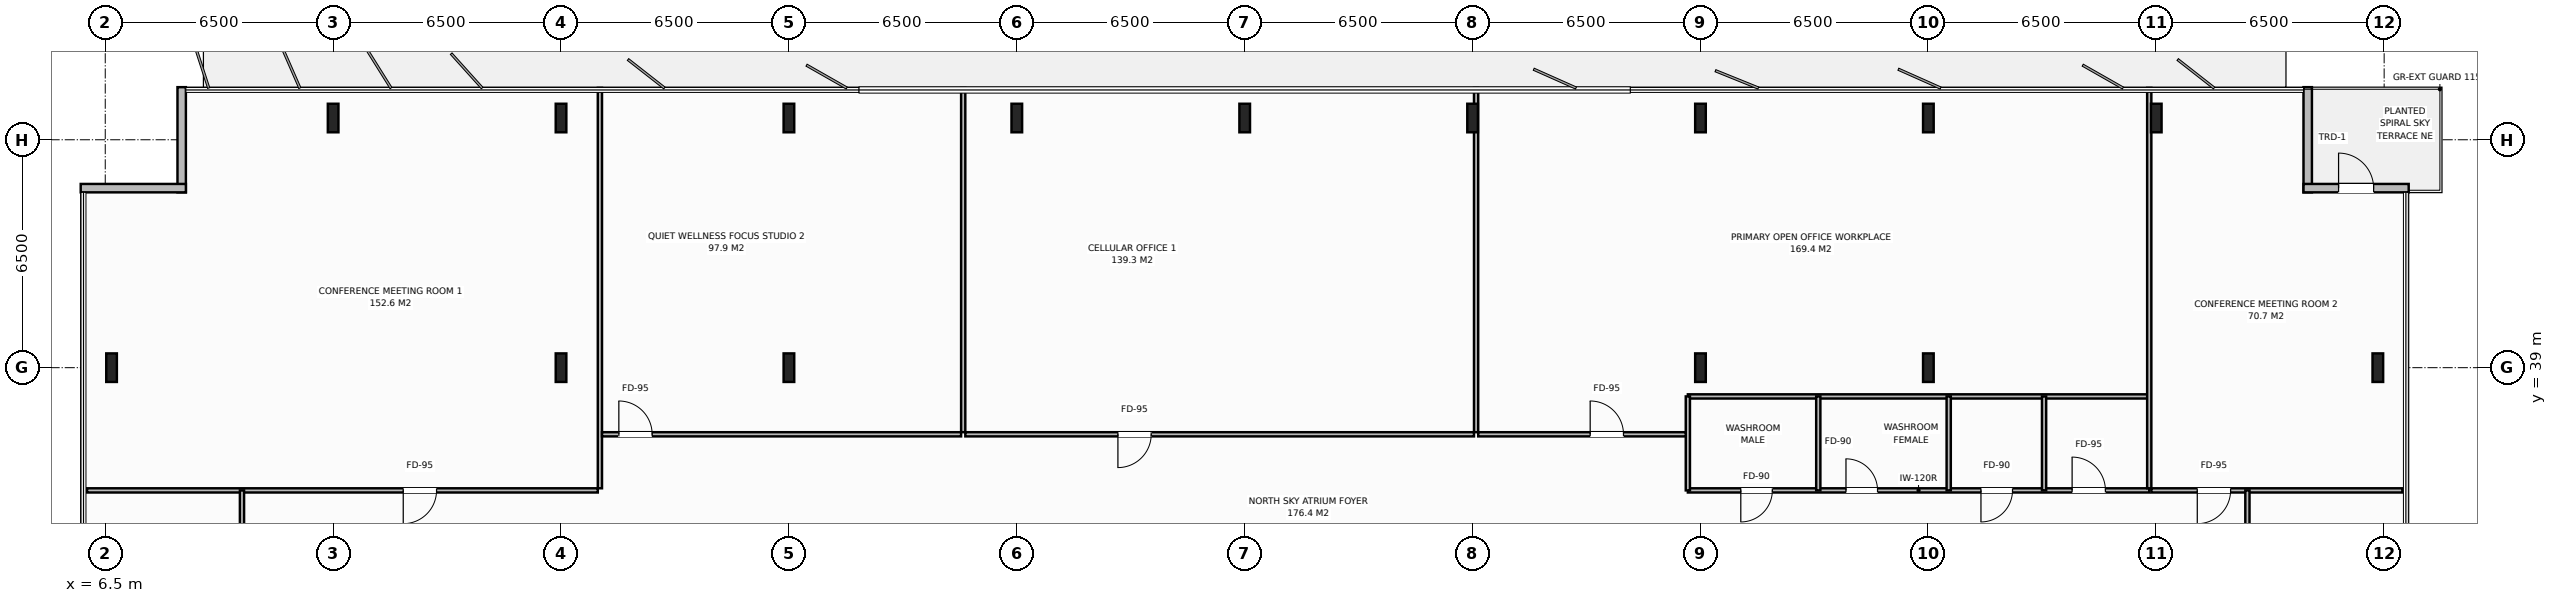
"""IFC4 building model, lengths in metres.
Left out: names, types, materials, properties, quantities, classifications, styles, units other than length and angle.
Written with IfcOpenShell. Run it as: python <this file> out.ifc"""

import sys

from ifc_helpers import new_model, si_unit, direction, frame, frame_2d, origin, origin_2d, place, context, subcontext, project, spatial, rectangle, i_section, extrude, element, fill, save


model = new_model("IFC4")
c1 = context("Model", 3, precision=1e-05, world=origin(), true_north=direction((0.0, 1.0)))
c2 = subcontext(c1, "Body", "Model", "MODEL_VIEW")
j1 = project(units=[si_unit("LENGTHUNIT", "METRE"), si_unit("PLANEANGLEUNIT", "RADIAN")], contexts=[c1])
p1 = place(None, origin())
s1 = spatial("IfcSite", under=j1, at=p1, CompositionType="ELEMENT")
p2 = place(p1, origin())
s2 = spatial("IfcBuilding", under=s1, at=p2, CompositionType="ELEMENT")
p3 = place(p2, frame((0.0, 0.0, 202.4)))
s3 = spatial("IfcBuildingStorey", under=s2, at=p3, CompositionType="ELEMENT", Elevation=202.4)
for number, where, z_axis, x_axis in (
    (1, (19.5, 39.0, 0.0), (0.0, 0.0, 1.0), (1.0, 0.0, 0.0)),
    (2, (58.5, 39.0, 0.0), (0.0, 0.0, 1.0), (1.0, 0.0, 0.0)),
    (3, (26.0, 39.0, 0.0), (0.0, 0.0, 1.0), (1.0, 0.0, 0.0)),
    (4, (52.0, 39.0, 0.0), (0.0, 0.0, 1.0), (1.0, 0.0, 0.0)),
    (5, (13.0, 46.12, 0.0), (0.0, 0.0, 1.0), (1.0, 0.0, 0.0)),
    (6, (19.5, 46.12, 0.0), (0.0, 0.0, 1.0), (1.0, 0.0, 0.0)),
    (7, (26.0, 46.12, 0.0), (0.0, 0.0, 1.0), (1.0, 0.0, 0.0)),
    (8, (32.5, 46.12, 0.0), (0.0, 0.0, 1.0), (1.0, 0.0, 0.0)),
    (9, (39.0, 46.12, 0.0), (0.0, 0.0, 1.0), (1.0, 0.0, 0.0)),
    (10, (45.5, 46.12, 0.0), (0.0, 0.0, 1.0), (1.0, 0.0, 0.0)),
    (11, (52.0, 46.12, 0.0), (0.0, 0.0, 1.0), (1.0, 0.0, 0.0)),
    (12, (58.5, 46.12, 0.0), (0.0, 0.0, 1.0), (1.0, 0.0, 0.0)),
    (13, (65.0, 46.12, 0.0), (0.0, 0.0, 1.0), (1.0, 0.0, 0.0)),
    (14, (6.68, 39.0, 0.0), (0.0, 0.0, 1.0), (1.0, 0.0, 0.0)),
    (15, (71.32, 39.0, 0.0), (0.0, 0.0, 1.0), (1.0, 0.0, 0.0)),
):
    element("IfcColumn", number, at=place(p3, frame(where, z_axis=z_axis, x_axis=x_axis)), inside=s3, PredefinedType="COLUMN", context=c2, shape_type="SweptSolid", body=[
        extrude(i_section(OverallWidth=0.303, OverallDepth=0.814, WebThickness=0.021, FlangeThickness=0.04, at=origin_2d()), origin(), (0.0, 0.0, 1.0), 3.8),
    ])
for number, where, z_axis, x_axis in (
    (16, (8.68, 44.0, 0.0), (0.0, 0.0, 1.0), (0.0, 1.0, 0.0)),
    (17, (5.8, 44.12, 0.0), (0.0, 0.0, 1.0), (1.0, 0.0, 0.0)),
    (18, (69.32, 47.0, 0.0), (0.0, 0.0, 1.0), (0.0, -1.0, 0.0)),
):
    element("IfcWall", number, at=place(p3, frame(where, z_axis=z_axis, x_axis=x_axis)), inside=s3, PredefinedType="STANDARD", context=c2, shape_type="SweptSolid", body=[
        extrude(rectangle(XDim=3.0, YDim=0.24, at=frame_2d((1.5, 0.0))), origin(), (0.0, 0.0, 1.0), 3.58),
    ])
p4 = place(p3, frame((69.2, 44.12, 0.0), z_axis=(0.0, 0.0, 1.0), x_axis=(1.0, 0.0, 0.0)))
e19 = element("IfcWall", 19, at=p4, inside=s3, PredefinedType="STANDARD", context=c2, shape_type="SweptSolid", body=[
    extrude(rectangle(XDim=3.0, YDim=0.24, at=frame_2d((1.5, 0.0))), origin(), (0.0, 0.0, 1.0), 3.58),
])
p5 = place(p4, frame((1.0, 0.0, 0.0)))
e20 = element("IfcOpeningElement", 20, at=p5, cuts=e19, PredefinedType="OPENING", context=c2, shape_type="SweptSolid", body=[
    extrude(rectangle(XDim=1.0, YDim=2.2, at=frame_2d((0.5, 1.1))), frame((0.0, 0.13, 0.0), z_axis=(0.0, -1.0, 0.0), x_axis=(1.0, 0.0, 0.0)), (0.0, 0.0, 1.0), 0.26),
])
p6 = place(p3, frame((51.64, 35.5, 0.0), z_axis=(0.0, 0.0, 1.0), x_axis=(1.0, 0.0, 0.0)))
e21 = element("IfcWall", 21, at=p6, inside=s3, PredefinedType="PARTITIONING", context=c2, shape_type="SweptSolid", body=[
    extrude(rectangle(XDim=13.16, YDim=0.12, at=frame_2d((6.58, 0.0))), origin(), (0.0, 0.0, 1.0), 3.58),
])
p7 = place(p6, frame((1.51, 0.0, 0.0)))
e22 = element("IfcOpeningElement", 22, at=p7, cuts=e21, PredefinedType="OPENING", context=c2, shape_type="SweptSolid", body=[
    extrude(rectangle(XDim=0.9, YDim=2.15, at=frame_2d((0.45, 1.075))), frame((0.0, 0.07, 0.0), z_axis=(0.0, -1.0, 0.0), x_axis=(1.0, 0.0, 0.0)), (0.0, 0.0, 1.0), 0.14),
])
p8 = place(p6, frame((4.51, 0.0, 0.0)))
e23 = element("IfcOpeningElement", 23, at=p8, cuts=e21, PredefinedType="OPENING", context=c2, shape_type="SweptSolid", body=[
    extrude(rectangle(XDim=0.9, YDim=2.15, at=frame_2d((0.45, 1.075))), frame((0.0, 0.07, 0.0), z_axis=(0.0, -1.0, 0.0), x_axis=(1.0, 0.0, 0.0)), (0.0, 0.0, 1.0), 0.14),
])
p9 = place(p6, frame((8.36, 0.0, 0.0)))
e24 = element("IfcOpeningElement", 24, at=p9, cuts=e21, PredefinedType="OPENING", context=c2, shape_type="SweptSolid", body=[
    extrude(rectangle(XDim=0.9, YDim=2.15, at=frame_2d((0.45, 1.075))), frame((0.0, 0.07, 0.0), z_axis=(0.0, -1.0, 0.0), x_axis=(1.0, 0.0, 0.0)), (0.0, 0.0, 1.0), 0.14),
])
p10 = place(p6, frame((10.96, 0.0, 0.0)))
e25 = element("IfcOpeningElement", 25, at=p10, cuts=e21, PredefinedType="OPENING", context=c2, shape_type="SweptSolid", body=[
    extrude(rectangle(XDim=0.95, YDim=2.15, at=frame_2d((0.475, 1.075))), frame((0.0, 0.07, 0.0), z_axis=(0.0, -1.0, 0.0), x_axis=(1.0, 0.0, 0.0)), (0.0, 0.0, 1.0), 0.14),
])
p11 = place(p3, frame((51.64, 38.18, 0.0), z_axis=(0.0, 0.0, 1.0), x_axis=(1.0, 0.0, 0.0)))
e26 = element("IfcWall", 26, at=p11, inside=s3, PredefinedType="PARTITIONING", context=c2, shape_type="SweptSolid", body=[
    extrude(rectangle(XDim=13.16, YDim=0.12, at=frame_2d((6.58, 0.0))), origin(), (0.0, 0.0, 1.0), 3.58),
])
for number, where, z_axis, x_axis in (
    (27, (51.64, 35.5, 0.0), (0.0, 0.0, 1.0), (0.0, 1.0, 0.0)),
    (28, (55.36, 35.5, 0.0), (0.0, 0.0, 1.0), (0.0, 1.0, 0.0)),
    (29, (59.08, 35.5, 0.0), (0.0, 0.0, 1.0), (0.0, 1.0, 0.0)),
    (30, (61.8, 35.5, 0.0), (0.0, 0.0, 1.0), (0.0, 1.0, 0.0)),
):
    element("IfcWall", number, at=place(p3, frame(where, z_axis=z_axis, x_axis=x_axis)), inside=s3, PredefinedType="PARTITIONING", context=c2, shape_type="SweptSolid", body=[
        extrude(rectangle(XDim=2.68, YDim=0.12, at=frame_2d((1.34, 0.0))), origin(), (0.0, 0.0, 1.0), 3.58),
    ])
p12 = place(p3, frame((20.609, 35.56, 0.0), z_axis=(0.0, 0.0, 1.0), x_axis=(0.0, 1.0, 0.0)))
e31 = element("IfcWall", 31, at=p12, inside=s3, PredefinedType="PARTITIONING", context=c2, shape_type="SweptSolid", body=[
    extrude(rectangle(XDim=11.42, YDim=0.12, at=frame_2d((5.71, 0.0))), origin(), (0.0, 0.0, 1.0), 3.58),
])
p13 = place(p3, frame((5.98, 35.5, 0.0), z_axis=(0.0, 0.0, 1.0), x_axis=(1.0, 0.0, 0.0)))
e32 = element("IfcWall", 32, at=p13, inside=s3, PredefinedType="PARTITIONING", context=c2, shape_type="SweptSolid", body=[
    extrude(rectangle(XDim=14.569, YDim=0.12, at=frame_2d((7.284, 0.0))), origin(), (0.0, 0.0, 1.0), 3.58),
])
p14 = place(p13, frame((9.02, 0.0, 0.0)))
e33 = element("IfcOpeningElement", 33, at=p14, cuts=e32, PredefinedType="OPENING", context=c2, shape_type="SweptSolid", body=[
    extrude(rectangle(XDim=0.95, YDim=2.15, at=frame_2d((0.475, 1.075))), frame((0.0, 0.07, 0.0), z_axis=(0.0, -1.0, 0.0), x_axis=(1.0, 0.0, 0.0)), (0.0, 0.0, 1.0), 0.14),
])
p15 = place(p3, frame((30.971, 37.16, 0.0), z_axis=(0.0, 0.0, 1.0), x_axis=(0.0, 1.0, 0.0)))
e34 = element("IfcWall", 34, at=p15, inside=s3, PredefinedType="PARTITIONING", context=c2, shape_type="SweptSolid", body=[
    extrude(rectangle(XDim=9.82, YDim=0.12, at=frame_2d((4.91, 0.0))), origin(), (0.0, 0.0, 1.0), 3.58),
])
p16 = place(p3, frame((20.669, 37.1, 0.0), z_axis=(0.0, 0.0, 1.0), x_axis=(1.0, 0.0, 0.0)))
e35 = element("IfcWall", 35, at=p16, inside=s3, PredefinedType="PARTITIONING", context=c2, shape_type="SweptSolid", body=[
    extrude(rectangle(XDim=10.242, YDim=0.12, at=frame_2d((5.121, 0.0))), origin(), (0.0, 0.0, 1.0), 3.58),
])
p17 = place(p16, frame((0.48, 0.0, 0.0)))
e36 = element("IfcOpeningElement", 36, at=p17, cuts=e35, PredefinedType="OPENING", context=c2, shape_type="SweptSolid", body=[
    extrude(rectangle(XDim=0.95, YDim=2.15, at=frame_2d((0.475, 1.075))), frame((0.0, 0.07, 0.0), z_axis=(0.0, -1.0, 0.0), x_axis=(1.0, 0.0, 0.0)), (0.0, 0.0, 1.0), 0.14),
])
p18 = place(p3, frame((45.6, 37.16, 0.0), z_axis=(0.0, 0.0, 1.0), x_axis=(0.0, 1.0, 0.0)))
e37 = element("IfcWall", 37, at=p18, inside=s3, PredefinedType="PARTITIONING", context=c2, shape_type="SweptSolid", body=[
    extrude(rectangle(XDim=9.82, YDim=0.12, at=frame_2d((4.91, 0.0))), origin(), (0.0, 0.0, 1.0), 2.88),
])
p19 = place(p3, frame((31.031, 37.1, 0.0), z_axis=(0.0, 0.0, 1.0), x_axis=(1.0, 0.0, 0.0)))
e38 = element("IfcWall", 38, at=p19, inside=s3, PredefinedType="PARTITIONING", context=c2, shape_type="SweptSolid", body=[
    extrude(rectangle(XDim=14.509, YDim=0.12, at=frame_2d((7.254, 0.0))), origin(), (0.0, 0.0, 1.0), 3.58),
])
p20 = place(p19, frame((4.353, 0.0, 0.0)))
e39 = element("IfcOpeningElement", 39, at=p20, cuts=e38, PredefinedType="OPENING", context=c2, shape_type="SweptSolid", body=[
    extrude(rectangle(XDim=0.95, YDim=2.15, at=frame_2d((0.475, 1.075))), frame((0.0, 0.07, 0.0), z_axis=(0.0, -1.0, 0.0), x_axis=(1.0, 0.0, 0.0)), (0.0, 0.0, 1.0), 0.14),
])
p21 = place(p3, frame((64.8, 35.56, 0.0), z_axis=(0.0, 0.0, 1.0), x_axis=(0.0, 1.0, 0.0)))
e40 = element("IfcWall", 40, at=p21, inside=s3, PredefinedType="PARTITIONING", context=c2, shape_type="SweptSolid", body=[
    extrude(rectangle(XDim=11.42, YDim=0.12, at=frame_2d((5.71, 0.0))), origin(), (0.0, 0.0, 1.0), 2.88),
])
p22 = place(p3, frame((45.66, 37.1, 0.0), z_axis=(0.0, 0.0, 1.0), x_axis=(1.0, 0.0, 0.0)))
e41 = element("IfcWall", 41, at=p22, inside=s3, PredefinedType="PARTITIONING", context=c2, shape_type="SweptSolid", body=[
    extrude(rectangle(XDim=5.92, YDim=0.12, at=frame_2d((2.96, 0.0))), origin(), (0.0, 0.0, 1.0), 3.58),
])
p23 = place(p22, frame((3.194, 0.0, 0.0)))
e42 = element("IfcOpeningElement", 42, at=p23, cuts=e41, PredefinedType="OPENING", context=c2, shape_type="SweptSolid", body=[
    extrude(rectangle(XDim=0.95, YDim=2.15, at=frame_2d((0.475, 1.075))), frame((0.0, 0.07, 0.0), z_axis=(0.0, -1.0, 0.0), x_axis=(1.0, 0.0, 0.0)), (0.0, 0.0, 1.0), 0.14),
])
p24 = place(p3, frame((64.86, 35.5, 0.0), z_axis=(0.0, 0.0, 1.0), x_axis=(1.0, 0.0, 0.0)))
e43 = element("IfcWall", 43, at=p24, inside=s3, PredefinedType="PARTITIONING", context=c2, shape_type="SweptSolid", body=[
    extrude(rectangle(XDim=7.16, YDim=0.12, at=frame_2d((3.58, 0.0))), origin(), (0.0, 0.0, 1.0), 3.58),
])
p25 = place(p24, frame((1.31, 0.0, 0.0)))
e44 = element("IfcOpeningElement", 44, at=p25, cuts=e43, PredefinedType="OPENING", context=c2, shape_type="SweptSolid", body=[
    extrude(rectangle(XDim=0.95, YDim=2.15, at=frame_2d((0.475, 1.075))), frame((0.0, 0.07, 0.0), z_axis=(0.0, -1.0, 0.0), x_axis=(1.0, 0.0, 0.0)), (0.0, 0.0, 1.0), 0.14),
])
p26 = place(p3, frame((10.4, 16.5, 0.0), z_axis=(0.0, 0.0, 1.0), x_axis=(0.0, 1.0, 0.0)))
e45 = element("IfcWall", 45, at=p26, inside=s3, PredefinedType="PARTITIONING", context=c2, shape_type="SweptSolid", body=[
    extrude(rectangle(XDim=19.0, YDim=0.12, at=frame_2d((9.5, 0.0))), origin(), (0.0, 0.0, 1.0), 3.58),
])
p27 = place(p26, frame((9.025, 0.0, 0.0)))
e46 = element("IfcOpeningElement", 46, at=p27, cuts=e45, PredefinedType="OPENING", context=c2, shape_type="SweptSolid", body=[
    extrude(rectangle(XDim=0.95, YDim=2.15, at=frame_2d((0.475, 1.075))), frame((0.0, 0.07, 0.0), z_axis=(0.0, -1.0, 0.0), x_axis=(1.0, 0.0, 0.0)), (0.0, 0.0, 1.0), 0.14),
])
p28 = place(p3, frame((67.6, 26.0, 0.0), z_axis=(0.0, 0.0, 1.0), x_axis=(0.0, 1.0, 0.0)))
e47 = element("IfcWall", 47, at=p28, inside=s3, PredefinedType="PARTITIONING", context=c2, shape_type="SweptSolid", body=[
    extrude(rectangle(XDim=9.5, YDim=0.12, at=frame_2d((4.75, 0.0))), origin(), (0.0, 0.0, 1.0), 3.58),
])
p29 = place(p28, frame((3.225, 0.0, 0.0)))
e48 = element("IfcOpeningElement", 48, at=p29, cuts=e47, PredefinedType="OPENING", context=c2, shape_type="SweptSolid", body=[
    extrude(rectangle(XDim=0.95, YDim=2.15, at=frame_2d((0.475, 1.075))), frame((0.0, 0.07, 0.0), z_axis=(0.0, -1.0, 0.0), x_axis=(1.0, 0.0, 0.0)), (0.0, 0.0, 1.0), 0.14),
])
p30 = place(p5, origin())
e49 = element("IfcDoor", 49, at=p30, inside=s3, OperationType="SINGLE_SWING_LEFT", PredefinedType="DOOR", context=c2, shape_type="SweptSolid", body=[
    extrude(rectangle(XDim=1.0, YDim=2.2, at=frame_2d((0.5, 1.1))), frame((0.0, 0.025, 0.0), z_axis=(0.0, -1.0, 0.0), x_axis=(1.0, 0.0, 0.0)), (0.0, 0.0, 1.0), 0.05),
])
fill(e20, e49)
p31 = place(p7, origin())
e50 = element("IfcDoor", 50, at=p31, inside=s3, OperationType="SINGLE_SWING_RIGHT", PredefinedType="DOOR", context=c2, shape_type="SweptSolid", body=[
    extrude(rectangle(XDim=0.9, YDim=2.15, at=frame_2d((0.45, 1.075))), frame((0.0, 0.025, 0.0), z_axis=(0.0, -1.0, 0.0), x_axis=(1.0, 0.0, 0.0)), (0.0, 0.0, 1.0), 0.05),
])
fill(e22, e50)
p32 = place(p8, origin())
e51 = element("IfcDoor", 51, at=p32, inside=s3, OperationType="SINGLE_SWING_LEFT", PredefinedType="DOOR", context=c2, shape_type="SweptSolid", body=[
    extrude(rectangle(XDim=0.9, YDim=2.15, at=frame_2d((0.45, 1.075))), frame((0.0, 0.025, 0.0), z_axis=(0.0, -1.0, 0.0), x_axis=(1.0, 0.0, 0.0)), (0.0, 0.0, 1.0), 0.05),
])
fill(e23, e51)
p33 = place(p9, origin())
e52 = element("IfcDoor", 52, at=p33, inside=s3, OperationType="SINGLE_SWING_RIGHT", PredefinedType="DOOR", context=c2, shape_type="SweptSolid", body=[
    extrude(rectangle(XDim=0.9, YDim=2.15, at=frame_2d((0.45, 1.075))), frame((0.0, 0.025, 0.0), z_axis=(0.0, -1.0, 0.0), x_axis=(1.0, 0.0, 0.0)), (0.0, 0.0, 1.0), 0.05),
])
fill(e24, e52)
p34 = place(p10, origin())
e53 = element("IfcDoor", 53, at=p34, inside=s3, OperationType="SINGLE_SWING_LEFT", PredefinedType="DOOR", context=c2, shape_type="SweptSolid", body=[
    extrude(rectangle(XDim=0.95, YDim=2.15, at=frame_2d((0.475, 1.075))), frame((0.0, 0.025, 0.0), z_axis=(0.0, -1.0, 0.0), x_axis=(1.0, 0.0, 0.0)), (0.0, 0.0, 1.0), 0.05),
])
fill(e25, e53)
p35 = place(p14, origin())
e54 = element("IfcDoor", 54, at=p35, inside=s3, OperationType="SINGLE_SWING_RIGHT", PredefinedType="DOOR", context=c2, shape_type="SweptSolid", body=[
    extrude(rectangle(XDim=0.95, YDim=2.15, at=frame_2d((0.475, 1.075))), frame((0.0, 0.025, 0.0), z_axis=(0.0, -1.0, 0.0), x_axis=(1.0, 0.0, 0.0)), (0.0, 0.0, 1.0), 0.05),
])
fill(e33, e54)
p36 = place(p17, origin())
e55 = element("IfcDoor", 55, at=p36, inside=s3, OperationType="SINGLE_SWING_LEFT", PredefinedType="DOOR", context=c2, shape_type="SweptSolid", body=[
    extrude(rectangle(XDim=0.95, YDim=2.15, at=frame_2d((0.475, 1.075))), frame((0.0, 0.025, 0.0), z_axis=(0.0, -1.0, 0.0), x_axis=(1.0, 0.0, 0.0)), (0.0, 0.0, 1.0), 0.05),
])
fill(e36, e55)
p37 = place(p20, origin())
e56 = element("IfcDoor", 56, at=p37, inside=s3, OperationType="SINGLE_SWING_RIGHT", PredefinedType="DOOR", context=c2, shape_type="SweptSolid", body=[
    extrude(rectangle(XDim=0.95, YDim=2.15, at=frame_2d((0.475, 1.075))), frame((0.0, 0.025, 0.0), z_axis=(0.0, -1.0, 0.0), x_axis=(1.0, 0.0, 0.0)), (0.0, 0.0, 1.0), 0.05),
])
fill(e39, e56)
p38 = place(p23, origin())
e57 = element("IfcDoor", 57, at=p38, inside=s3, OperationType="SINGLE_SWING_LEFT", PredefinedType="DOOR", context=c2, shape_type="SweptSolid", body=[
    extrude(rectangle(XDim=0.95, YDim=2.15, at=frame_2d((0.475, 1.075))), frame((0.0, 0.025, 0.0), z_axis=(0.0, -1.0, 0.0), x_axis=(1.0, 0.0, 0.0)), (0.0, 0.0, 1.0), 0.05),
])
fill(e42, e57)
p39 = place(p25, origin())
e58 = element("IfcDoor", 58, at=p39, inside=s3, OperationType="SINGLE_SWING_RIGHT", PredefinedType="DOOR", context=c2, shape_type="SweptSolid", body=[
    extrude(rectangle(XDim=0.95, YDim=2.15, at=frame_2d((0.475, 1.075))), frame((0.0, 0.025, 0.0), z_axis=(0.0, -1.0, 0.0), x_axis=(1.0, 0.0, 0.0)), (0.0, 0.0, 1.0), 0.05),
])
fill(e44, e58)
save(model, sys.argv[1])
